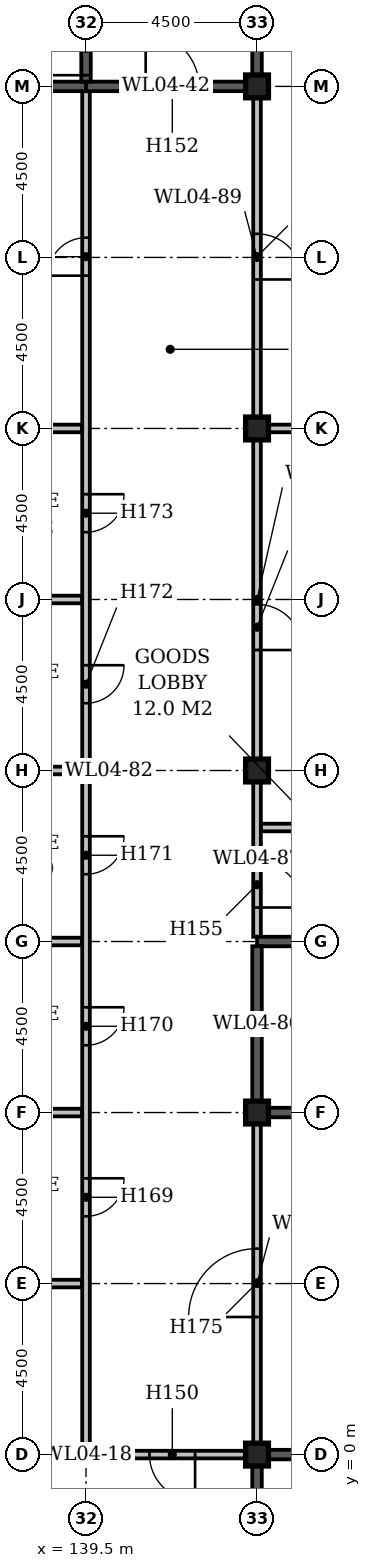
"""IFC4 building model, lengths in metres.
Left out: names, types, materials, properties, quantities, classifications, styles, units other than length and angle.
Written with IfcOpenShell. Run it as: python <this file> out.ifc"""

import sys

from ifc_helpers import new_model, si_unit, direction, frame, frame_2d, origin, origin_2d, place, context, subcontext, project, spatial, rectangle, extrude, element, fill, save


model = new_model("IFC4")
c1 = context("Model", 3, precision=1e-05, world=origin(), true_north=direction((0.0, 1.0)))
c2 = subcontext(c1, "Body", "Model", "MODEL_VIEW")
j1 = project(units=[si_unit("LENGTHUNIT", "METRE"), si_unit("PLANEANGLEUNIT", "RADIAN")], contexts=[c1])
p1 = place(None, origin())
s1 = spatial("IfcSite", under=j1, at=p1, CompositionType="ELEMENT")
p2 = place(p1, origin())
s2 = spatial("IfcBuilding", under=s1, at=p2, CompositionType="ELEMENT")
p3 = place(p2, frame((0.0, 0.0, 24.0)))
s3 = spatial("IfcBuildingStorey", under=s2, at=p3, CompositionType="ELEMENT", Elevation=24.0)
for number, where, z_axis, x_axis in (
    (1, (144.0, 0.0, 0.0), (0.0, 0.0, 1.0), (1.0, 0.0, 0.0)),
    (2, (144.0, 9.0, 0.0), (0.0, 0.0, 1.0), (1.0, 0.0, 0.0)),
    (3, (144.0, 18.0, 0.0), (0.0, 0.0, 1.0), (1.0, 0.0, 0.0)),
    (4, (144.0, 27.0, 0.0), (0.0, 0.0, 1.0), (1.0, 0.0, 0.0)),
    (5, (144.0, 36.0, 0.0), (0.0, 0.0, 1.0), (1.0, 0.0, 0.0)),
):
    element("IfcColumn", number, at=place(p3, frame(where, z_axis=z_axis, x_axis=x_axis)), inside=s3, PredefinedType="COLUMN", context=c2, shape_type="SweptSolid", body=[
        extrude(rectangle(XDim=0.6, YDim=0.6, at=origin_2d()), origin(), (0.0, 0.0, 1.0), 4.7),
    ])
p4 = place(p3, frame((135.4, 0.0, 0.0), z_axis=(0.0, 0.0, 1.0), x_axis=(1.0, 0.0, 0.0)))
e6 = element("IfcWall", 6, at=p4, inside=s3, PredefinedType="STANDARD", context=c2, shape_type="SweptSolid", body=[
    extrude(rectangle(XDim=8.3, YDim=0.2, at=frame_2d((4.15, 0.0))), origin(), (0.0, 0.0, 1.0), 4.7),
])
p5 = place(p4, frame((5.77, 0.0, 0.0)))
e7 = element("IfcOpeningElement", 7, at=p5, cuts=e6, PredefinedType="OPENING", context=c2, shape_type="SweptSolid", body=[
    extrude(rectangle(XDim=1.2, YDim=2.1, at=frame_2d((0.6, 1.05))), frame((0.0, 0.112, 0.0), z_axis=(0.0, -1.0, 0.0), x_axis=(1.0, 0.0, 0.0)), (0.0, 0.0, 1.0), 0.224),
])
p6 = place(p4, frame((1.37, 0.0, 0.0)))
e8 = element("IfcOpeningElement", 8, at=p6, cuts=e6, PredefinedType="OPENING", context=c2, shape_type="SweptSolid", body=[
    extrude(rectangle(XDim=1.0, YDim=2.1, at=frame_2d((0.5, 1.05))), frame((0.0, 0.112, 0.0), z_axis=(0.0, -1.0, 0.0), x_axis=(1.0, 0.0, 0.0)), (0.0, 0.0, 1.0), 0.224),
])
p7 = place(p3, frame((144.3, 0.0, 0.0), z_axis=(0.0, 0.0, 1.0), x_axis=(1.0, 0.0, 0.0)))
e9 = element("IfcWall", 9, at=p7, inside=s3, PredefinedType="STANDARD", context=c2, shape_type="SweptSolid", body=[
    extrude(rectangle(XDim=4.2, YDim=0.25, at=frame_2d((2.1, 0.0))), origin(), (0.0, 0.0, 1.0), 4.7),
])
p8 = place(p3, frame((135.25, 4.5, 0.0), z_axis=(0.0, 0.0, 1.0), x_axis=(1.0, 0.0, 0.0)))
e10 = element("IfcWall", 10, at=p8, inside=s3, PredefinedType="STANDARD", context=c2, shape_type="SweptSolid", body=[
    extrude(rectangle(XDim=4.15, YDim=0.2, at=frame_2d((2.075, 0.0))), origin(), (0.0, 0.0, 1.0), 4.7),
])
p9 = place(p3, frame((135.4, 9.0, 0.0), z_axis=(0.0, 0.0, 1.0), x_axis=(1.0, 0.0, 0.0)))
e11 = element("IfcWall", 11, at=p9, inside=s3, PredefinedType="STANDARD", context=c2, shape_type="SweptSolid", body=[
    extrude(rectangle(XDim=4.0, YDim=0.2, at=frame_2d((2.0, 0.0))), origin(), (0.0, 0.0, 1.0), 4.7),
])
p10 = place(p3, frame((144.3, 9.0, 0.0), z_axis=(0.0, 0.0, 1.0), x_axis=(1.0, 0.0, 0.0)))
e12 = element("IfcWall", 12, at=p10, inside=s3, PredefinedType="STANDARD", context=c2, shape_type="SweptSolid", body=[
    extrude(rectangle(XDim=4.2, YDim=0.25, at=frame_2d((2.1, 0.0))), origin(), (0.0, 0.0, 1.0), 4.7),
])
p11 = place(p3, frame((135.25, 13.5, 0.0), z_axis=(0.0, 0.0, 1.0), x_axis=(1.0, 0.0, 0.0)))
e13 = element("IfcWall", 13, at=p11, inside=s3, PredefinedType="STANDARD", context=c2, shape_type="SweptSolid", body=[
    extrude(rectangle(XDim=4.15, YDim=0.2, at=frame_2d((2.075, 0.0))), origin(), (0.0, 0.0, 1.0), 4.7),
])
p12 = place(p3, frame((144.0, 13.5, 0.0), z_axis=(0.0, 0.0, 1.0), x_axis=(1.0, 0.0, 0.0)))
e14 = element("IfcWall", 14, at=p12, inside=s3, PredefinedType="STANDARD", context=c2, shape_type="SweptSolid", body=[
    extrude(rectangle(XDim=4.5, YDim=0.25, at=frame_2d((2.25, 0.0))), origin(), (0.0, 0.0, 1.0), 4.7),
])
p13 = place(p12, frame((1.72, 0.0, 0.0)))
e15 = element("IfcOpeningElement", 15, at=p13, cuts=e14, PredefinedType="OPENING", context=c2, shape_type="SweptSolid", body=[
    extrude(rectangle(XDim=1.1, YDim=2.1, at=frame_2d((0.55, 1.05))), frame((0.0, 0.137, 0.0), z_axis=(0.0, -1.0, 0.0), x_axis=(1.0, 0.0, 0.0)), (0.0, 0.0, 1.0), 0.274),
])
p14 = place(p3, frame((144.1, 16.5, 0.0), z_axis=(0.0, 0.0, 1.0), x_axis=(1.0, 0.0, 0.0)))
e16 = element("IfcWall", 16, at=p14, inside=s3, PredefinedType="STANDARD", context=c2, shape_type="SweptSolid", body=[
    extrude(rectangle(XDim=8.725, YDim=0.2, at=frame_2d((4.362, 0.0))), origin(), (0.0, 0.0, 1.0), 4.7),
])
p15 = place(p3, frame((135.4, 18.0, 0.0), z_axis=(0.0, 0.0, 1.0), x_axis=(1.0, 0.0, 0.0)))
e17 = element("IfcWall", 17, at=p15, inside=s3, PredefinedType="STANDARD", context=c2, shape_type="SweptSolid", body=[
    extrude(rectangle(XDim=4.0, YDim=0.2, at=frame_2d((2.0, 0.0))), origin(), (0.0, 0.0, 1.0), 4.7),
])
p16 = place(p3, frame((135.25, 22.5, 0.0), z_axis=(0.0, 0.0, 1.0), x_axis=(1.0, 0.0, 0.0)))
e18 = element("IfcWall", 18, at=p16, inside=s3, PredefinedType="STANDARD", context=c2, shape_type="SweptSolid", body=[
    extrude(rectangle(XDim=4.15, YDim=0.2, at=frame_2d((2.075, 0.0))), origin(), (0.0, 0.0, 1.0), 4.7),
])
p17 = place(p3, frame((135.4, 27.0, 0.0), z_axis=(0.0, 0.0, 1.0), x_axis=(1.0, 0.0, 0.0)))
e19 = element("IfcWall", 19, at=p17, inside=s3, PredefinedType="STANDARD", context=c2, shape_type="SweptSolid", body=[
    extrude(rectangle(XDim=4.0, YDim=0.2, at=frame_2d((2.0, 0.0))), origin(), (0.0, 0.0, 1.0), 4.7),
])
p18 = place(p3, frame((144.3, 27.0, 0.0), z_axis=(0.0, 0.0, 1.0), x_axis=(1.0, 0.0, 0.0)))
e20 = element("IfcWall", 20, at=p18, inside=s3, PredefinedType="STANDARD", context=c2, shape_type="SweptSolid", body=[
    extrude(rectangle(XDim=8.4, YDim=0.2, at=frame_2d((4.2, 0.0))), origin(), (0.0, 0.0, 1.0), 4.7),
])
p19 = place(p3, frame((135.3, 36.0, 0.0), z_axis=(0.0, 0.0, 1.0), x_axis=(1.0, 0.0, 0.0)))
e21 = element("IfcWall", 21, at=p19, inside=s3, PredefinedType="STANDARD", context=c2, shape_type="SweptSolid", body=[
    extrude(rectangle(XDim=4.2, YDim=0.25, at=frame_2d((2.1, 0.0))), origin(), (0.0, 0.0, 1.0), 4.7),
])
p20 = place(p3, frame((139.5, 36.0, 0.0), z_axis=(0.0, 0.0, 1.0), x_axis=(1.0, 0.0, 0.0)))
e22 = element("IfcWall", 22, at=p20, inside=s3, PredefinedType="STANDARD", context=c2, shape_type="SweptSolid", body=[
    extrude(rectangle(XDim=4.2, YDim=0.25, at=frame_2d((2.1, 0.0))), origin(), (0.0, 0.0, 1.0), 4.7),
])
p21 = place(p20, frame((1.57, 0.0, 0.0)))
e23 = element("IfcOpeningElement", 23, at=p21, cuts=e22, PredefinedType="OPENING", context=c2, shape_type="SweptSolid", body=[
    extrude(rectangle(XDim=1.4, YDim=2.1, at=frame_2d((0.7, 1.05))), frame((0.0, 0.137, 0.0), z_axis=(0.0, -1.0, 0.0), x_axis=(1.0, 0.0, 0.0)), (0.0, 0.0, 1.0), 0.274),
])
p22 = place(p3, frame((139.5, 0.1, 0.0), z_axis=(0.0, 0.0, 1.0), x_axis=(0.0, 1.0, 0.0)))
e24 = element("IfcWall", 24, at=p22, inside=s3, PredefinedType="STANDARD", context=c2, shape_type="SweptSolid", body=[
    extrude(rectangle(XDim=35.775, YDim=0.2, at=frame_2d((17.887, 0.0))), origin(), (0.0, 0.0, 1.0), 4.7),
])
p23 = place(p22, frame((6.17, 0.0, 0.0)))
e25 = element("IfcOpeningElement", 25, at=p23, cuts=e24, PredefinedType="OPENING", context=c2, shape_type="SweptSolid", body=[
    extrude(rectangle(XDim=1.0, YDim=2.1, at=frame_2d((0.5, 1.05))), frame((0.0, 0.112, 0.0), z_axis=(0.0, -1.0, 0.0), x_axis=(1.0, 0.0, 0.0)), (0.0, 0.0, 1.0), 0.224),
])
p24 = place(p22, frame((10.67, 0.0, 0.0)))
e26 = element("IfcOpeningElement", 26, at=p24, cuts=e24, PredefinedType="OPENING", context=c2, shape_type="SweptSolid", body=[
    extrude(rectangle(XDim=1.0, YDim=2.1, at=frame_2d((0.5, 1.05))), frame((0.0, 0.112, 0.0), z_axis=(0.0, -1.0, 0.0), x_axis=(1.0, 0.0, 0.0)), (0.0, 0.0, 1.0), 0.224),
])
p25 = place(p22, frame((15.17, 0.0, 0.0)))
e27 = element("IfcOpeningElement", 27, at=p25, cuts=e24, PredefinedType="OPENING", context=c2, shape_type="SweptSolid", body=[
    extrude(rectangle(XDim=1.0, YDim=2.1, at=frame_2d((0.5, 1.05))), frame((0.0, 0.112, 0.0), z_axis=(0.0, -1.0, 0.0), x_axis=(1.0, 0.0, 0.0)), (0.0, 0.0, 1.0), 0.224),
])
p26 = place(p22, frame((19.67, 0.0, 0.0)))
e28 = element("IfcOpeningElement", 28, at=p26, cuts=e24, PredefinedType="OPENING", context=c2, shape_type="SweptSolid", body=[
    extrude(rectangle(XDim=1.0, YDim=2.1, at=frame_2d((0.5, 1.05))), frame((0.0, 0.112, 0.0), z_axis=(0.0, -1.0, 0.0), x_axis=(1.0, 0.0, 0.0)), (0.0, 0.0, 1.0), 0.224),
])
p27 = place(p22, frame((24.17, 0.0, 0.0)))
e29 = element("IfcOpeningElement", 29, at=p27, cuts=e24, PredefinedType="OPENING", context=c2, shape_type="SweptSolid", body=[
    extrude(rectangle(XDim=1.0, YDim=2.1, at=frame_2d((0.5, 1.05))), frame((0.0, 0.112, 0.0), z_axis=(0.0, -1.0, 0.0), x_axis=(1.0, 0.0, 0.0)), (0.0, 0.0, 1.0), 0.224),
])
p28 = place(p22, frame((30.92, 0.0, 0.0)))
e30 = element("IfcOpeningElement", 30, at=p28, cuts=e24, PredefinedType="OPENING", context=c2, shape_type="SweptSolid", body=[
    extrude(rectangle(XDim=1.0, YDim=2.1, at=frame_2d((0.5, 1.05))), frame((0.0, 0.112, 0.0), z_axis=(0.0, -1.0, 0.0), x_axis=(1.0, 0.0, 0.0)), (0.0, 0.0, 1.0), 0.224),
])
p29 = place(p3, frame((139.5, 36.125, 0.0), z_axis=(0.0, 0.0, 1.0), x_axis=(0.0, 1.0, 0.0)))
e31 = element("IfcWall", 31, at=p29, inside=s3, PredefinedType="STANDARD", context=c2, shape_type="SweptSolid", body=[
    extrude(rectangle(XDim=8.7, YDim=0.25, at=frame_2d((4.35, 0.0))), origin(), (0.0, 0.0, 1.0), 4.7),
])
p30 = place(p29, frame((0.17, 0.0, 0.0)))
e32 = element("IfcOpeningElement", 32, at=p30, cuts=e31, PredefinedType="OPENING", context=c2, shape_type="SweptSolid", body=[
    extrude(rectangle(XDim=1.4, YDim=2.1, at=frame_2d((0.7, 1.05))), frame((0.0, 0.137, 0.0), z_axis=(0.0, -1.0, 0.0), x_axis=(1.0, 0.0, 0.0)), (0.0, 0.0, 1.0), 0.274),
])
p31 = place(p3, frame((144.0, -8.7, 0.0), z_axis=(0.0, 0.0, 1.0), x_axis=(0.0, 1.0, 0.0)))
e33 = element("IfcWall", 33, at=p31, inside=s3, PredefinedType="STANDARD", context=c2, shape_type="SweptSolid", body=[
    extrude(rectangle(XDim=8.4, YDim=0.25, at=frame_2d((4.2, 0.0))), origin(), (0.0, 0.0, 1.0), 4.7),
])
p32 = place(p31, frame((0.12, 0.0, 0.0)))
e34 = element("IfcOpeningElement", 34, at=p32, cuts=e33, PredefinedType="OPENING", context=c2, shape_type="SweptSolid", body=[
    extrude(rectangle(XDim=1.2, YDim=2.1, at=frame_2d((0.6, 1.05))), frame((0.0, 0.137, 0.0), z_axis=(0.0, -1.0, 0.0), x_axis=(1.0, 0.0, 0.0)), (0.0, 0.0, 1.0), 0.274),
])
p33 = place(p3, frame((144.0, 0.3, 0.0), z_axis=(0.0, 0.0, 1.0), x_axis=(0.0, 1.0, 0.0)))
e35 = element("IfcWall", 35, at=p33, inside=s3, PredefinedType="STANDARD", context=c2, shape_type="SweptSolid", body=[
    extrude(rectangle(XDim=8.4, YDim=0.2, at=frame_2d((4.2, 0.0))), origin(), (0.0, 0.0, 1.0), 4.7),
])
p34 = place(p33, frame((3.32, 0.0, 0.0)))
e36 = element("IfcOpeningElement", 36, at=p34, cuts=e35, PredefinedType="OPENING", context=c2, shape_type="SweptSolid", body=[
    extrude(rectangle(XDim=1.8, YDim=2.4, at=frame_2d((0.9, 1.2))), frame((0.0, 0.112, 0.0), z_axis=(0.0, -1.0, 0.0), x_axis=(1.0, 0.0, 0.0)), (0.0, 0.0, 1.0), 0.224),
])
p35 = place(p3, frame((144.0, 9.3, 0.0), z_axis=(0.0, 0.0, 1.0), x_axis=(0.0, 1.0, 0.0)))
e37 = element("IfcWall", 37, at=p35, inside=s3, PredefinedType="STANDARD", context=c2, shape_type="SweptSolid", body=[
    extrude(rectangle(XDim=4.075, YDim=0.25, at=frame_2d((2.038, 0.0))), origin(), (0.0, 0.0, 1.0), 4.7),
])
p36 = place(p3, frame((144.0, 13.625, 0.0), z_axis=(0.0, 0.0, 1.0), x_axis=(0.0, 1.0, 0.0)))
e38 = element("IfcWall", 38, at=p36, inside=s3, PredefinedType="STANDARD", context=c2, shape_type="SweptSolid", body=[
    extrude(rectangle(XDim=4.075, YDim=0.2, at=frame_2d((2.038, 0.0))), origin(), (0.0, 0.0, 1.0), 4.7),
])
p37 = place(p36, frame((0.77, 0.0, 0.0)))
e39 = element("IfcOpeningElement", 39, at=p37, cuts=e38, PredefinedType="OPENING", context=c2, shape_type="SweptSolid", body=[
    extrude(rectangle(XDim=1.2, YDim=2.1, at=frame_2d((0.6, 1.05))), frame((0.0, 0.112, 0.0), z_axis=(0.0, -1.0, 0.0), x_axis=(1.0, 0.0, 0.0)), (0.0, 0.0, 1.0), 0.224),
])
p38 = place(p3, frame((144.0, 18.3, 0.0), z_axis=(0.0, 0.0, 1.0), x_axis=(0.0, 1.0, 0.0)))
e40 = element("IfcWall", 40, at=p38, inside=s3, PredefinedType="STANDARD", context=c2, shape_type="SweptSolid", body=[
    extrude(rectangle(XDim=8.4, YDim=0.2, at=frame_2d((4.2, 0.0))), origin(), (0.0, 0.0, 1.0), 4.7),
])
p39 = place(p38, frame((2.87, 0.0, 0.0)))
e41 = element("IfcOpeningElement", 41, at=p39, cuts=e40, PredefinedType="OPENING", context=c2, shape_type="SweptSolid", body=[
    extrude(rectangle(XDim=1.2, YDim=2.1, at=frame_2d((0.6, 1.05))), frame((0.0, 0.112, 0.0), z_axis=(0.0, -1.0, 0.0), x_axis=(1.0, 0.0, 0.0)), (0.0, 0.0, 1.0), 0.224),
])
p40 = place(p3, frame((144.0, 27.3, 0.0), z_axis=(0.0, 0.0, 1.0), x_axis=(0.0, 1.0, 0.0)))
e42 = element("IfcWall", 42, at=p40, inside=s3, PredefinedType="STANDARD", context=c2, shape_type="SweptSolid", body=[
    extrude(rectangle(XDim=8.4, YDim=0.2, at=frame_2d((4.2, 0.0))), origin(), (0.0, 0.0, 1.0), 4.7),
])
p41 = place(p40, frame((3.62, 0.0, 0.0)))
e43 = element("IfcOpeningElement", 43, at=p41, cuts=e42, PredefinedType="OPENING", context=c2, shape_type="SweptSolid", body=[
    extrude(rectangle(XDim=1.2, YDim=2.1, at=frame_2d((0.6, 1.05))), frame((0.0, 0.112, 0.0), z_axis=(0.0, -1.0, 0.0), x_axis=(1.0, 0.0, 0.0)), (0.0, 0.0, 1.0), 0.224),
])
p42 = place(p3, frame((144.0, 36.3, 0.0), z_axis=(0.0, 0.0, 1.0), x_axis=(0.0, 1.0, 0.0)))
e44 = element("IfcWall", 44, at=p42, inside=s3, PredefinedType="STANDARD", context=c2, shape_type="SweptSolid", body=[
    extrude(rectangle(XDim=8.4, YDim=0.25, at=frame_2d((4.2, 0.0))), origin(), (0.0, 0.0, 1.0), 4.7),
])
p43 = place(p5, origin())
e45 = element("IfcDoor", 45, at=p43, inside=s3, OperationType="SINGLE_SWING_RIGHT", PredefinedType="DOOR", context=c2, shape_type="SweptSolid", body=[
    extrude(rectangle(XDim=1.2, YDim=2.1, at=frame_2d((0.6, 1.05))), frame((0.0, 0.025, 0.0), z_axis=(0.0, -1.0, 0.0), x_axis=(1.0, 0.0, 0.0)), (0.0, 0.0, 1.0), 0.05),
])
fill(e7, e45)
p44 = place(p30, origin())
e46 = element("IfcDoor", 46, at=p44, inside=s3, OperationType="DOUBLE_DOOR_SINGLE_SWING", PredefinedType="DOOR", context=c2, shape_type="SweptSolid", body=[
    extrude(rectangle(XDim=1.4, YDim=2.1, at=frame_2d((0.7, 1.05))), frame((0.0, 0.025, 0.0), z_axis=(0.0, -1.0, 0.0), x_axis=(1.0, 0.0, 0.0)), (0.0, 0.0, 1.0), 0.05),
])
fill(e32, e46)
p45 = place(p21, origin())
e47 = element("IfcDoor", 47, at=p45, inside=s3, OperationType="DOUBLE_DOOR_SINGLE_SWING", PredefinedType="DOOR", context=c2, shape_type="SweptSolid", body=[
    extrude(rectangle(XDim=1.4, YDim=2.1, at=frame_2d((0.7, 1.05))), frame((0.0, 0.025, 0.0), z_axis=(0.0, -1.0, 0.0), x_axis=(1.0, 0.0, 0.0)), (0.0, 0.0, 1.0), 0.05),
])
fill(e23, e47)
p46 = place(p37, frame((1.2, 0.0, 0.0), z_axis=(0.0, 0.0, 1.0), x_axis=(-1.0, 0.0, 0.0)))
e48 = element("IfcDoor", 48, at=p46, inside=s3, OperationType="SINGLE_SWING_RIGHT", PredefinedType="DOOR", context=c2, shape_type="SweptSolid", body=[
    extrude(rectangle(XDim=1.2, YDim=2.1, at=frame_2d((0.6, 1.05))), frame((0.0, 0.025, 0.0), z_axis=(0.0, -1.0, 0.0), x_axis=(1.0, 0.0, 0.0)), (0.0, 0.0, 1.0), 0.05),
])
fill(e39, e48)
p47 = place(p23, origin())
e49 = element("IfcDoor", 49, at=p47, inside=s3, OperationType="SINGLE_SWING_RIGHT", PredefinedType="DOOR", context=c2, shape_type="SweptSolid", body=[
    extrude(rectangle(XDim=1.0, YDim=2.1, at=frame_2d((0.5, 1.05))), frame((0.0, 0.025, 0.0), z_axis=(0.0, -1.0, 0.0), x_axis=(1.0, 0.0, 0.0)), (0.0, 0.0, 1.0), 0.05),
])
fill(e25, e49)
p48 = place(p24, origin())
e50 = element("IfcDoor", 50, at=p48, inside=s3, OperationType="SINGLE_SWING_RIGHT", PredefinedType="DOOR", context=c2, shape_type="SweptSolid", body=[
    extrude(rectangle(XDim=1.0, YDim=2.1, at=frame_2d((0.5, 1.05))), frame((0.0, 0.025, 0.0), z_axis=(0.0, -1.0, 0.0), x_axis=(1.0, 0.0, 0.0)), (0.0, 0.0, 1.0), 0.05),
])
fill(e26, e50)
p49 = place(p25, origin())
e51 = element("IfcDoor", 51, at=p49, inside=s3, OperationType="SINGLE_SWING_RIGHT", PredefinedType="DOOR", context=c2, shape_type="SweptSolid", body=[
    extrude(rectangle(XDim=1.0, YDim=2.1, at=frame_2d((0.5, 1.05))), frame((0.0, 0.025, 0.0), z_axis=(0.0, -1.0, 0.0), x_axis=(1.0, 0.0, 0.0)), (0.0, 0.0, 1.0), 0.05),
])
fill(e27, e51)
p50 = place(p26, origin())
e52 = element("IfcDoor", 52, at=p50, inside=s3, OperationType="SINGLE_SWING_RIGHT", PredefinedType="DOOR", context=c2, shape_type="SweptSolid", body=[
    extrude(rectangle(XDim=1.0, YDim=2.1, at=frame_2d((0.5, 1.05))), frame((0.0, 0.025, 0.0), z_axis=(0.0, -1.0, 0.0), x_axis=(1.0, 0.0, 0.0)), (0.0, 0.0, 1.0), 0.05),
])
fill(e28, e52)
p51 = place(p27, origin())
e53 = element("IfcDoor", 53, at=p51, inside=s3, OperationType="SINGLE_SWING_RIGHT", PredefinedType="DOOR", context=c2, shape_type="SweptSolid", body=[
    extrude(rectangle(XDim=1.0, YDim=2.1, at=frame_2d((0.5, 1.05))), frame((0.0, 0.025, 0.0), z_axis=(0.0, -1.0, 0.0), x_axis=(1.0, 0.0, 0.0)), (0.0, 0.0, 1.0), 0.05),
])
fill(e29, e53)
p52 = place(p28, origin())
e54 = element("IfcDoor", 54, at=p52, inside=s3, OperationType="SINGLE_SWING_LEFT", PredefinedType="DOOR", context=c2, shape_type="SweptSolid", body=[
    extrude(rectangle(XDim=1.0, YDim=2.1, at=frame_2d((0.5, 1.05))), frame((0.0, 0.025, 0.0), z_axis=(0.0, -1.0, 0.0), x_axis=(1.0, 0.0, 0.0)), (0.0, 0.0, 1.0), 0.05),
])
fill(e30, e54)
p53 = place(p34, origin())
e55 = element("IfcDoor", 55, at=p53, inside=s3, OperationType="DOUBLE_DOOR_SINGLE_SWING", PredefinedType="DOOR", context=c2, shape_type="SweptSolid", body=[
    extrude(rectangle(XDim=1.8, YDim=2.4, at=frame_2d((0.9, 1.2))), frame((0.0, 0.025, 0.0), z_axis=(0.0, -1.0, 0.0), x_axis=(1.0, 0.0, 0.0)), (0.0, 0.0, 1.0), 0.05),
])
fill(e36, e55)
p54 = place(p39, frame((1.2, 0.0, 0.0), z_axis=(0.0, 0.0, 1.0), x_axis=(-1.0, 0.0, 0.0)))
e56 = element("IfcDoor", 56, at=p54, inside=s3, OperationType="SINGLE_SWING_RIGHT", PredefinedType="DOOR", context=c2, shape_type="SweptSolid", body=[
    extrude(rectangle(XDim=1.2, YDim=2.1, at=frame_2d((0.6, 1.05))), frame((0.0, 0.025, 0.0), z_axis=(0.0, -1.0, 0.0), x_axis=(1.0, 0.0, 0.0)), (0.0, 0.0, 1.0), 0.05),
])
fill(e41, e56)
p55 = place(p41, frame((1.2, 0.0, 0.0), z_axis=(0.0, 0.0, 1.0), x_axis=(-1.0, 0.0, 0.0)))
e57 = element("IfcDoor", 57, at=p55, inside=s3, OperationType="SINGLE_SWING_RIGHT", PredefinedType="DOOR", context=c2, shape_type="SweptSolid", body=[
    extrude(rectangle(XDim=1.2, YDim=2.1, at=frame_2d((0.6, 1.05))), frame((0.0, 0.025, 0.0), z_axis=(0.0, -1.0, 0.0), x_axis=(1.0, 0.0, 0.0)), (0.0, 0.0, 1.0), 0.05),
])
fill(e43, e57)
save(model, sys.argv[1])
